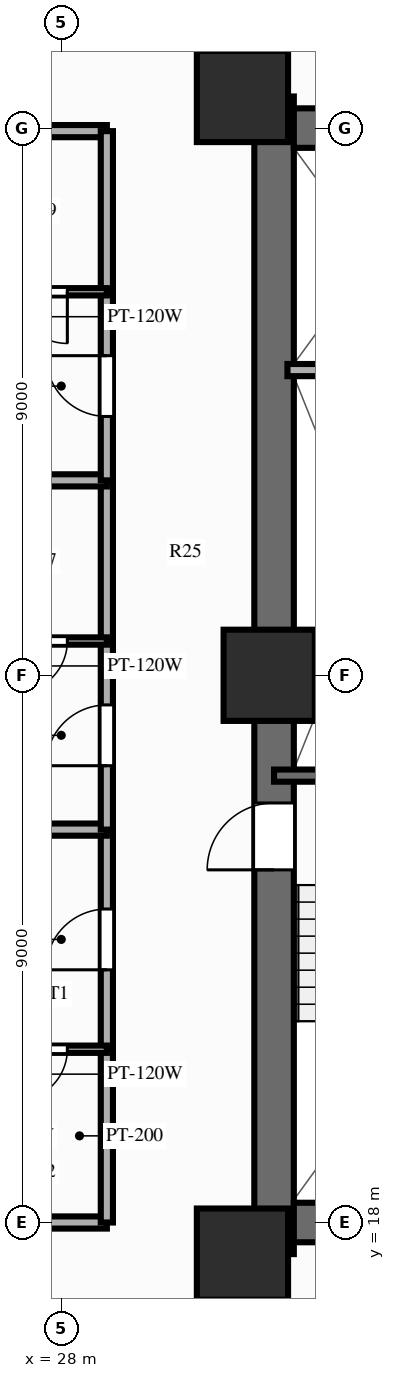
"""IFC4 building model, lengths in metres.
Left out: names, types, materials, properties, quantities, classifications, styles, units other than length and angle.
Written with IfcOpenShell. Run it as: python <this file> out.ifc"""

import sys

from ifc_helpers import new_model, si_unit, direction, frame, frame_2d, origin, origin_2d, place, context, subcontext, project, spatial, rectangle, extrude, source, transform, mapped, element, fill, save


model = new_model("IFC4")
c1 = context("Model", 3, precision=1e-05, world=origin(), true_north=direction((0.0, 1.0)))
c2 = subcontext(c1, "Body", "Model", "MODEL_VIEW")
j1 = project(units=[si_unit("LENGTHUNIT", "METRE"), si_unit("PLANEANGLEUNIT", "RADIAN")], contexts=[c1])
p1 = place(None, origin())
s1 = spatial("IfcSite", under=j1, at=p1, CompositionType="ELEMENT")
p2 = place(p1, origin())
s2 = spatial("IfcBuilding", under=s1, at=p2, CompositionType="ELEMENT")
p3 = place(p2, frame((0.0, 0.0, 61.4)))
s3 = spatial("IfcBuildingStorey", under=s2, at=p3, CompositionType="ELEMENT", Elevation=61.4)
p4 = place(p3, frame((31.5, 17.48, 0.0), z_axis=(0.0, 0.0, 1.0), x_axis=(0.0, 1.0, 0.0)))
e1 = element("IfcWall", 1, at=p4, inside=s3, PredefinedType="SHEAR", context=c2, shape_type="SweptSolid", body=[
    extrude(rectangle(XDim=19.04, YDim=0.65, at=frame_2d((9.52, 0.0))), origin(), (0.0, 0.0, 1.0), 3.0),
])
p5 = place(p4, frame((6.32, 0.0, 0.0)))
e2 = element("IfcOpeningElement", 2, at=p5, cuts=e1, PredefinedType="OPENING", context=c2, shape_type="SweptSolid", body=[
    extrude(rectangle(XDim=1.1, YDim=2.15, at=frame_2d((0.55, 1.075))), frame((0.0, 0.337, 0.0), z_axis=(0.0, -1.0, 0.0), x_axis=(1.0, 0.0, 0.0)), (0.0, 0.0, 1.0), 0.674),
])
p6 = place(p3, frame((31.825, 18.0, 0.0), z_axis=(0.0, 0.0, 1.0), x_axis=(1.0, 0.0, 0.0)))
e3 = element("IfcWall", 3, at=p6, inside=s3, PredefinedType="SHEAR", context=c2, shape_type="SweptSolid", body=[
    extrude(rectangle(XDim=12.35, YDim=0.65, at=frame_2d((6.175, 0.0))), origin(), (0.0, 0.0, 1.0), 3.0),
])
p7 = place(p3, frame((31.825, 36.0, 0.0), z_axis=(0.0, 0.0, 1.0), x_axis=(1.0, 0.0, 0.0)))
e4 = element("IfcWall", 4, at=p7, inside=s3, PredefinedType="SHEAR", context=c2, shape_type="SweptSolid", body=[
    extrude(rectangle(XDim=12.35, YDim=0.65, at=frame_2d((6.175, 0.0))), origin(), (0.0, 0.0, 1.0), 3.0),
])
p8 = place(p7, frame((5.125, 0.0, 0.0), z_axis=(0.0, 0.0, 1.0), x_axis=(-1.0, 0.0, 0.0)))
e5 = element("IfcOpeningElement", 5, at=p8, cuts=e4, PredefinedType="OPENING", context=c2, shape_type="SweptSolid", body=[
    extrude(rectangle(XDim=1.4, YDim=2.15, at=frame_2d((0.7, 1.075))), frame((0.0, 0.337, 0.0), z_axis=(0.0, -1.0, 0.0), x_axis=(1.0, 0.0, 0.0)), (0.0, 0.0, 1.0), 0.674),
])
m1 = source(origin(), c2, "Body", "SweptSolid", [
    extrude(rectangle(XDim=1.5, YDim=1.5, at=origin_2d()), origin(), (0.0, 0.0, 1.0), 3.0),
])
for number, where, z_axis, x_axis in (
    (6, (30.98, 17.48, 0.0), (0.0, 0.0, 1.0), (1.0, 0.0, 0.0)),
    (7, (30.98, 36.52, 0.0), (0.0, 0.0, 1.0), (1.0, 0.0, 0.0)),
    (8, (31.42, 27.0, 0.0), (0.0, 0.0, 1.0), (1.0, 0.0, 0.0)),
):
    element("IfcColumn", number, at=place(p3, frame(where, z_axis=z_axis, x_axis=x_axis)), inside=s3, PredefinedType="COLUMN", context=c2, shape_type="MappedRepresentation", body=[
        mapped(m1, transform((0.0, 0.0, 0.0), scale=1.0)),
    ])
p9 = place(p3, frame((31.5, 25.35, 0.0), z_axis=(0.0, 0.0, 1.0), x_axis=(1.0, 0.0, 0.0)))
e9 = element("IfcWall", 9, at=p9, inside=s3, PredefinedType="SOLIDWALL", context=c2, shape_type="SweptSolid", body=[
    extrude(rectangle(XDim=3.93, YDim=0.2, at=frame_2d((1.965, 0.0))), origin(), (0.0, 0.0, 1.0), 2.79),
])
p10 = place(p3, frame((31.72, 32.02, 0.0), z_axis=(0.0, 0.0, 1.0), x_axis=(1.0, 0.0, 0.0)))
e10 = element("IfcWall", 10, at=p10, inside=s3, PredefinedType="PARTITIONING", context=c2, shape_type="SweptSolid", body=[
    extrude(rectangle(XDim=2.8, YDim=0.2, at=frame_2d((1.4, 0.0))), origin(), (0.0, 0.0, 1.0), 2.79),
])
for number, where, z_axis, x_axis in (
    (11, (28.75, 18.0, 0.0), (0.0, 0.0, 1.0), (-1.0, 0.0, 0.0)),
    (12, (28.75, 35.95, 0.0), (0.0, 0.0, 1.0), (-1.0, 0.0, 0.0)),
):
    element("IfcWall", number, at=place(p3, frame(where, z_axis=z_axis, x_axis=x_axis)), inside=s3, PredefinedType="PARTITIONING", context=c2, shape_type="SweptSolid", body=[
        extrude(rectangle(XDim=16.6, YDim=0.2, at=frame_2d((8.3, 0.0))), origin(), (0.0, 0.0, 1.0), 2.24),
    ])
p11 = place(p3, frame((28.75, 18.0, 0.0), z_axis=(0.0, 0.0, 1.0), x_axis=(0.0, 1.0, 0.0)))
e13 = element("IfcWall", 13, at=p11, inside=s3, PredefinedType="PARTITIONING", context=c2, shape_type="SweptSolid", body=[
    extrude(rectangle(XDim=2.85, YDim=0.2, at=frame_2d((1.425, 0.0))), origin(), (0.0, 0.0, 1.0), 2.79),
])
p12 = place(p3, frame((28.75, 20.85, 0.0), z_axis=(0.0, 0.0, 1.0), x_axis=(0.0, 1.0, 0.0)))
e14 = element("IfcWall", 14, at=p12, inside=s3, PredefinedType="PARTITIONING", context=c2, shape_type="SweptSolid", body=[
    extrude(rectangle(XDim=3.612, YDim=0.2, at=frame_2d((1.806, 0.0))), origin(), (0.0, 0.0, 1.0), 2.79),
])
p13 = place(p12, frame((1.306, 0.0, 0.0)))
e15 = element("IfcOpeningElement", 15, at=p13, cuts=e14, PredefinedType="OPENING", context=c2, shape_type="SweptSolid", body=[
    extrude(rectangle(XDim=1.0, YDim=2.15, at=frame_2d((0.5, 1.075))), frame((0.0, 0.112, 0.0), z_axis=(0.0, -1.0, 0.0), x_axis=(1.0, 0.0, 0.0)), (0.0, 0.0, 1.0), 0.224),
])
p14 = place(p3, frame((28.75, 20.85, 0.0), z_axis=(0.0, 0.0, 1.0), x_axis=(-1.0, 0.0, 0.0)))
e16 = element("IfcWall", 16, at=p14, inside=s3, PredefinedType="PARTITIONING", context=c2, shape_type="SweptSolid", body=[
    extrude(rectangle(XDim=2.15, YDim=0.12, at=frame_2d((1.075, 0.0))), origin(), (0.0, 0.0, 1.0), 2.79),
])
p15 = place(p14, frame((0.65, 0.0, 0.0)))
e17 = element("IfcOpeningElement", 17, at=p15, cuts=e16, PredefinedType="OPENING", context=c2, shape_type="SweptSolid", body=[
    extrude(rectangle(XDim=0.85, YDim=2.05, at=frame_2d((0.425, 1.025))), frame((0.0, 0.072, 0.0), z_axis=(0.0, -1.0, 0.0), x_axis=(1.0, 0.0, 0.0)), (0.0, 0.0, 1.0), 0.144),
])
p16 = place(p3, frame((28.75, 24.462, 0.0), z_axis=(0.0, 0.0, 1.0), x_axis=(-1.0, 0.0, 0.0)))
e18 = element("IfcWall", 18, at=p16, inside=s3, PredefinedType="PARTITIONING", context=c2, shape_type="SweptSolid", body=[
    extrude(rectangle(XDim=16.6, YDim=0.2, at=frame_2d((8.3, 0.0))), origin(), (0.0, 0.0, 1.0), 2.79),
])
p17 = place(p3, frame((28.75, 24.462, 0.0), z_axis=(0.0, 0.0, 1.0), x_axis=(0.0, 1.0, 0.0)))
e19 = element("IfcWall", 19, at=p17, inside=s3, PredefinedType="PARTITIONING", context=c2, shape_type="SweptSolid", body=[
    extrude(rectangle(XDim=3.102, YDim=0.2, at=frame_2d((1.551, 0.0))), origin(), (0.0, 0.0, 1.0), 2.79),
])
p18 = place(p17, frame((1.051, 0.0, 0.0)))
e20 = element("IfcOpeningElement", 20, at=p18, cuts=e19, PredefinedType="OPENING", context=c2, shape_type="SweptSolid", body=[
    extrude(rectangle(XDim=1.0, YDim=2.15, at=frame_2d((0.5, 1.075))), frame((0.0, 0.112, 0.0), z_axis=(0.0, -1.0, 0.0), x_axis=(1.0, 0.0, 0.0)), (0.0, 0.0, 1.0), 0.224),
])
p19 = place(p3, frame((28.75, 27.564, 0.0), z_axis=(0.0, 0.0, 1.0), x_axis=(0.0, 1.0, 0.0)))
e21 = element("IfcWall", 21, at=p19, inside=s3, PredefinedType="PARTITIONING", context=c2, shape_type="SweptSolid", body=[
    extrude(rectangle(XDim=2.642, YDim=0.2, at=frame_2d((1.321, 0.0))), origin(), (0.0, 0.0, 1.0), 2.79),
])
p20 = place(p3, frame((28.75, 27.564, 0.0), z_axis=(0.0, 0.0, 1.0), x_axis=(-1.0, 0.0, 0.0)))
e22 = element("IfcWall", 22, at=p20, inside=s3, PredefinedType="PARTITIONING", context=c2, shape_type="SweptSolid", body=[
    extrude(rectangle(XDim=2.15, YDim=0.12, at=frame_2d((1.075, 0.0))), origin(), (0.0, 0.0, 1.0), 2.79),
])
p21 = place(p20, frame((0.65, 0.0, 0.0)))
e23 = element("IfcOpeningElement", 23, at=p21, cuts=e22, PredefinedType="OPENING", context=c2, shape_type="SweptSolid", body=[
    extrude(rectangle(XDim=0.85, YDim=2.05, at=frame_2d((0.425, 1.025))), frame((0.0, 0.072, 0.0), z_axis=(0.0, -1.0, 0.0), x_axis=(1.0, 0.0, 0.0)), (0.0, 0.0, 1.0), 0.144),
])
p22 = place(p3, frame((28.75, 30.206, 0.0), z_axis=(0.0, 0.0, 1.0), x_axis=(-1.0, 0.0, 0.0)))
e24 = element("IfcWall", 24, at=p22, inside=s3, PredefinedType="PARTITIONING", context=c2, shape_type="SweptSolid", body=[
    extrude(rectangle(XDim=16.6, YDim=0.2, at=frame_2d((8.3, 0.0))), origin(), (0.0, 0.0, 1.0), 2.79),
])
p23 = place(p3, frame((28.75, 30.206, 0.0), z_axis=(0.0, 0.0, 1.0), x_axis=(0.0, 1.0, 0.0)))
e25 = element("IfcWall", 25, at=p23, inside=s3, PredefinedType="PARTITIONING", context=c2, shape_type="SweptSolid", body=[
    extrude(rectangle(XDim=3.102, YDim=0.2, at=frame_2d((1.551, 0.0))), origin(), (0.0, 0.0, 1.0), 2.79),
])
p24 = place(p23, frame((1.051, 0.0, 0.0)))
e26 = element("IfcOpeningElement", 26, at=p24, cuts=e25, PredefinedType="OPENING", context=c2, shape_type="SweptSolid", body=[
    extrude(rectangle(XDim=1.0, YDim=2.15, at=frame_2d((0.5, 1.075))), frame((0.0, 0.112, 0.0), z_axis=(0.0, -1.0, 0.0), x_axis=(1.0, 0.0, 0.0)), (0.0, 0.0, 1.0), 0.224),
])
p25 = place(p3, frame((28.75, 33.308, 0.0), z_axis=(0.0, 0.0, 1.0), x_axis=(0.0, 1.0, 0.0)))
e27 = element("IfcWall", 27, at=p25, inside=s3, PredefinedType="PARTITIONING", context=c2, shape_type="SweptSolid", body=[
    extrude(rectangle(XDim=2.642, YDim=0.2, at=frame_2d((1.321, 0.0))), origin(), (0.0, 0.0, 1.0), 2.79),
])
p26 = place(p3, frame((28.75, 33.308, 0.0), z_axis=(0.0, 0.0, 1.0), x_axis=(-1.0, 0.0, 0.0)))
e28 = element("IfcWall", 28, at=p26, inside=s3, PredefinedType="PARTITIONING", context=c2, shape_type="SweptSolid", body=[
    extrude(rectangle(XDim=2.15, YDim=0.12, at=frame_2d((1.075, 0.0))), origin(), (0.0, 0.0, 1.0), 2.79),
])
p27 = place(p26, frame((0.65, 0.0, 0.0)))
e29 = element("IfcOpeningElement", 29, at=p27, cuts=e28, PredefinedType="OPENING", context=c2, shape_type="SweptSolid", body=[
    extrude(rectangle(XDim=0.85, YDim=2.05, at=frame_2d((0.425, 1.025))), frame((0.0, 0.072, 0.0), z_axis=(0.0, -1.0, 0.0), x_axis=(1.0, 0.0, 0.0)), (0.0, 0.0, 1.0), 0.144),
])
m2 = source(origin(), c2, "Body", "SweptSolid", [
    extrude(rectangle(XDim=1.1, YDim=2.15, at=frame_2d((0.55, 1.075))), frame((0.0, 0.025, 0.0), z_axis=(0.0, -1.0, 0.0), x_axis=(1.0, 0.0, 0.0)), (0.0, 0.0, 1.0), 0.05),
])
p28 = place(p5, origin())
e30 = element("IfcDoor", 30, at=p28, inside=s3, OperationType="SINGLE_SWING_LEFT", PredefinedType="DOOR", context=c2, shape_type="MappedRepresentation", body=[
    mapped(m2, transform((0.0, 0.0, 0.0), scale=1.0)),
])
fill(e2, e30)
m3 = source(origin(), c2, "Body", "SweptSolid", [
    extrude(rectangle(XDim=1.0, YDim=2.15, at=frame_2d((0.5, 1.075))), frame((0.0, 0.025, 0.0), z_axis=(0.0, -1.0, 0.0), x_axis=(1.0, 0.0, 0.0)), (0.0, 0.0, 1.0), 0.05),
])
p29 = place(p13, origin())
e31 = element("IfcDoor", 31, at=p29, inside=s3, OperationType="SINGLE_SWING_LEFT", PredefinedType="DOOR", context=c2, shape_type="MappedRepresentation", body=[
    mapped(m3, transform((0.0, 0.0, 0.0), scale=1.0)),
])
fill(e15, e31)
m4 = source(origin(), c2, "Body", "SweptSolid", [
    extrude(rectangle(XDim=0.85, YDim=2.05, at=frame_2d((0.425, 1.025))), frame((0.0, 0.025, 0.0), z_axis=(0.0, -1.0, 0.0), x_axis=(1.0, 0.0, 0.0)), (0.0, 0.0, 1.0), 0.05),
])
p30 = place(p15, origin())
e32 = element("IfcDoor", 32, at=p30, inside=s3, OperationType="SINGLE_SWING_RIGHT", PredefinedType="DOOR", context=c2, shape_type="MappedRepresentation", body=[
    mapped(m4, transform((0.0, 0.0, 0.0), scale=1.0)),
])
fill(e17, e32)
p31 = place(p18, origin())
e33 = element("IfcDoor", 33, at=p31, inside=s3, OperationType="SINGLE_SWING_LEFT", PredefinedType="DOOR", context=c2, shape_type="MappedRepresentation", body=[
    mapped(m3, transform((0.0, 0.0, 0.0), scale=1.0)),
])
fill(e20, e33)
p32 = place(p21, origin())
e34 = element("IfcDoor", 34, at=p32, inside=s3, OperationType="SINGLE_SWING_RIGHT", PredefinedType="DOOR", context=c2, shape_type="MappedRepresentation", body=[
    mapped(m4, transform((0.0, 0.0, 0.0), scale=1.0)),
])
fill(e23, e34)
p33 = place(p24, origin())
e35 = element("IfcDoor", 35, at=p33, inside=s3, OperationType="SINGLE_SWING_RIGHT", PredefinedType="DOOR", context=c2, shape_type="MappedRepresentation", body=[
    mapped(m3, transform((0.0, 0.0, 0.0), scale=1.0)),
])
fill(e26, e35)
p34 = place(p27, origin())
e36 = element("IfcDoor", 36, at=p34, inside=s3, OperationType="SINGLE_SWING_LEFT", PredefinedType="DOOR", context=c2, shape_type="MappedRepresentation", body=[
    mapped(m4, transform((0.0, 0.0, 0.0), scale=1.0)),
])
fill(e29, e36)
save(model, sys.argv[1])
